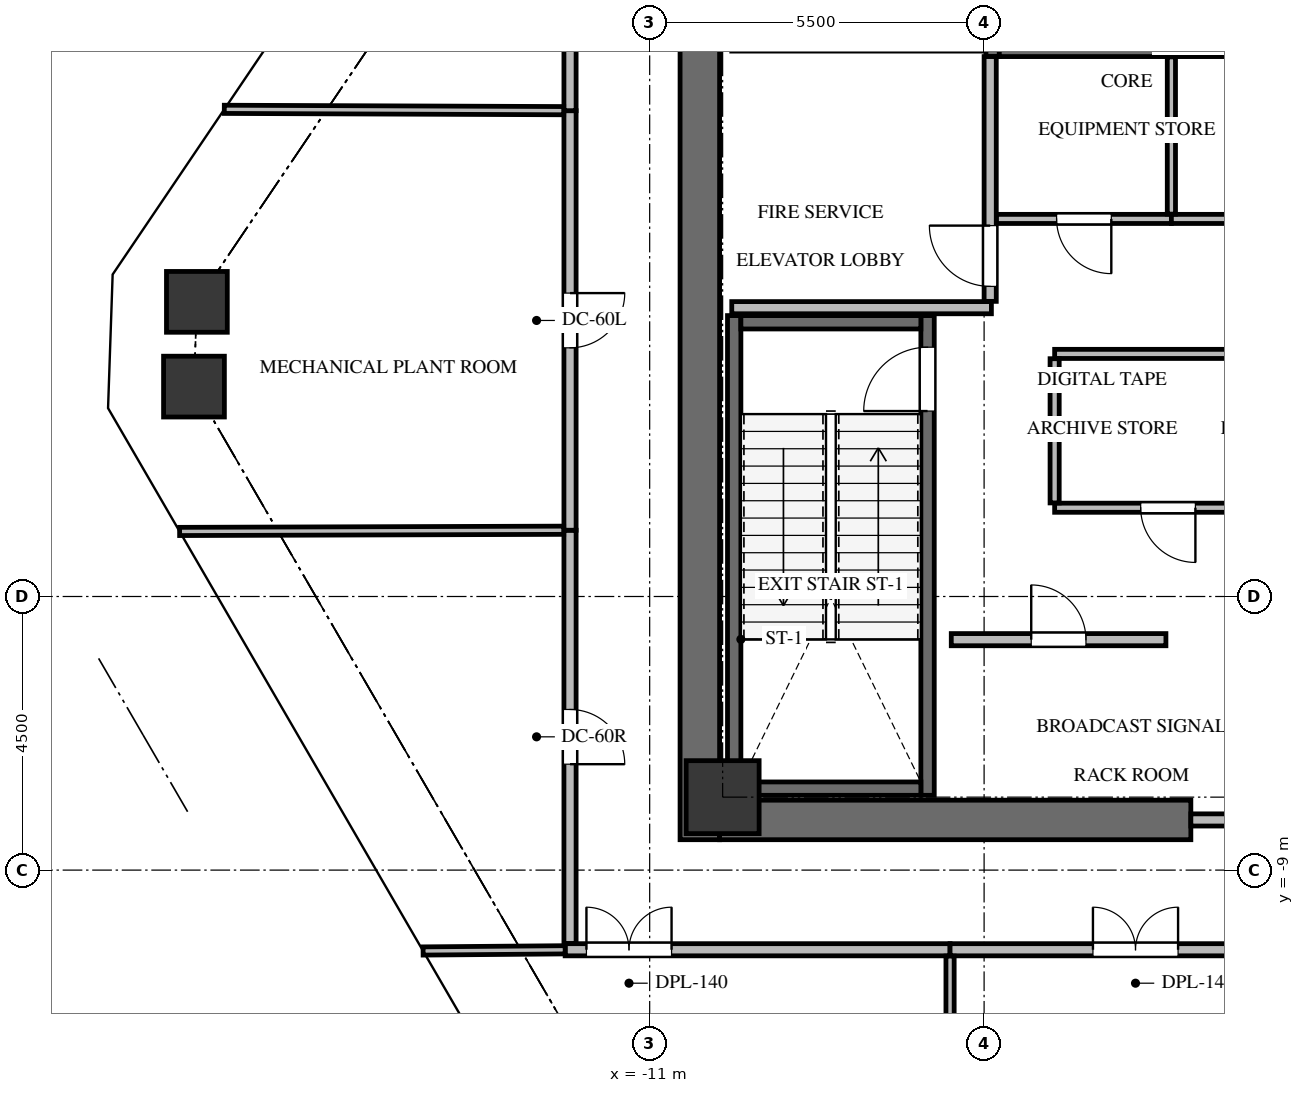
"""IFC4 building model, lengths in metres.
Left out: names, types, materials, properties, quantities, classifications, styles, units other than length and angle.
Written with IfcOpenShell. Run it as: python <this file> out.ifc"""

import sys

from ifc_helpers import new_model, si_unit, direction, frame, frame_2d, origin, origin_2d, place, context, subcontext, project, spatial, rectangle, extrude, source, transform, mapped, element, fill, save


model = new_model("IFC4")
c1 = context("Model", 3, precision=1e-05, world=origin(), true_north=direction((0.0, 1.0)))
c2 = subcontext(c1, "Body", "Model", "MODEL_VIEW")
j1 = project(units=[si_unit("LENGTHUNIT", "METRE"), si_unit("PLANEANGLEUNIT", "RADIAN")], contexts=[c1])
p1 = place(None, origin())
s1 = spatial("IfcSite", under=j1, at=p1, CompositionType="ELEMENT")
p2 = place(p1, origin())
s2 = spatial("IfcBuilding", under=s1, at=p2, CompositionType="ELEMENT")
p3 = place(p2, frame((0.0, 0.0, 213.4)))
s3 = spatial("IfcBuildingStorey", under=s2, at=p3, CompositionType="ELEMENT", Elevation=213.4)
p4 = place(p3, frame((-10.175, -8.5, 0.0), z_axis=(0.0, 0.0, 1.0), x_axis=(0.0, 1.0, 0.0)))
e1 = element("IfcWall", 1, at=p4, inside=s3, PredefinedType="SHEAR", context=c2, shape_type="SweptSolid", body=[
    extrude(rectangle(XDim=17.0, YDim=0.65, at=frame_2d((8.5, 0.0))), origin(), (0.0, 0.0, 1.0), 4.9),
])
p5 = place(p3, frame((-9.85, -8.175, 0.0), z_axis=(0.0, 0.0, 1.0), x_axis=(1.0, 0.0, 0.0)))
e2 = element("IfcWall", 2, at=p5, inside=s3, PredefinedType="SHEAR", context=c2, shape_type="SweptSolid", body=[
    extrude(rectangle(XDim=7.75, YDim=0.65, at=frame_2d((3.875, 0.0))), origin(), (0.0, 0.0, 1.0), 4.9),
])
p6 = place(p3, frame((-6.43, -7.77, -0.3), z_axis=(0.0, 0.0, 1.0), x_axis=(0.0, 1.0, 0.0)))
e3 = element("IfcWall", 3, at=p6, inside=s3, PredefinedType="SHEAR", context=c2, shape_type="SweptSolid", body=[
    extrude(rectangle(XDim=7.89, YDim=0.22, at=frame_2d((3.945, 0.0))), origin(), (0.0, 0.0, 1.0), 4.96),
])
p7 = place(p6, frame((6.32, 0.0, 0.0)))
e4 = element("IfcOpeningElement", 4, at=p7, cuts=e3, PredefinedType="OPENING", context=c2, shape_type="SweptSolid", body=[
    extrude(rectangle(XDim=1.05, YDim=2.15, at=frame_2d((0.525, 1.075))), frame((0.0, 0.12, 0.0), z_axis=(0.0, -1.0, 0.0), x_axis=(1.0, 0.0, 0.0)), (0.0, 0.0, 1.0), 0.24),
])
p8 = place(p3, frame((-9.61, 0.12, -0.3), z_axis=(0.0, 0.0, 1.0), x_axis=(0.0, -1.0, 0.0)))
e5 = element("IfcWall", 5, at=p8, inside=s3, PredefinedType="SHEAR", context=c2, shape_type="SweptSolid", body=[
    extrude(rectangle(XDim=7.89, YDim=0.22, at=frame_2d((3.945, 0.0))), origin(), (0.0, 0.0, 1.0), 4.96),
])
for number, where, z_axis, x_axis in (
    (6, (-9.5, -7.66, -0.3), (0.0, 0.0, 1.0), (1.0, 0.0, 0.0)),
    (7, (-6.54, 0.01, -0.3), (0.0, 0.0, 1.0), (-1.0, 0.0, 0.0)),
):
    element("IfcWall", number, at=place(p3, frame(where, z_axis=z_axis, x_axis=x_axis)), inside=s3, PredefinedType="SHEAR", context=c2, shape_type="SweptSolid", body=[
        extrude(rectangle(XDim=2.96, YDim=0.22, at=frame_2d((1.48, 0.0))), origin(), (0.0, 0.0, 1.0), 4.96),
    ])
p9 = place(p3, frame((-5.36, 7.78, -0.3), z_axis=(0.0, 0.0, 1.0), x_axis=(0.0, -1.0, 0.0)))
e8 = element("IfcWall", 8, at=p9, inside=s3, PredefinedType="SHEAR", context=c2, shape_type="SweptSolid", body=[
    extrude(rectangle(XDim=3.4, YDim=0.22, at=frame_2d((1.7, 0.0))), origin(), (0.0, 0.0, 1.0), 4.96),
])
p10 = place(p3, frame((-5.25, 4.49, -0.3), z_axis=(0.0, 0.0, 1.0), x_axis=(1.0, 0.0, 0.0)))
e9 = element("IfcWall", 9, at=p10, inside=s3, PredefinedType="SHEAR", context=c2, shape_type="SweptSolid", body=[
    extrude(rectangle(XDim=7.35, YDim=0.22, at=frame_2d((3.675, 0.0))), origin(), (0.0, 0.0, 1.0), 4.96),
])
p11 = place(p10, frame((5.85, 0.0, 0.0)))
e10 = element("IfcOpeningElement", 10, at=p11, cuts=e9, PredefinedType="OPENING", context=c2, shape_type="SweptSolid", body=[
    extrude(rectangle(XDim=1.05, YDim=2.15, at=frame_2d((0.525, 1.075))), frame((0.0, 0.12, 0.0), z_axis=(0.0, -1.0, 0.0), x_axis=(1.0, 0.0, 0.0)), (0.0, 0.0, 1.0), 0.24),
])
m1 = source(origin(), c2, "Body", "SweptSolid", [
    extrude(rectangle(XDim=1.2, YDim=1.2, at=origin_2d()), origin(), (0.0, 0.0, 1.0), 4.96),
])
p12 = place(p3, frame((-9.8, -7.8, -0.3), z_axis=(0.0, 0.0, 1.0), x_axis=(1.0, 0.0, 0.0)))
e11 = element("IfcColumn", 11, at=p12, inside=s3, PredefinedType="COLUMN", context=c2, shape_type="MappedRepresentation", body=[
    mapped(m1, transform((0.0, 0.0, 0.0), x_axis=(1.0, 0.0, 0.0), y_axis=(0.0, 1.0, 0.0), z_axis=(0.0, 0.0, 1.0), scale=1.0)),
])
m2 = source(origin(), c2, "Body", "SweptSolid", [
    extrude(rectangle(XDim=1.0, YDim=1.0, at=origin_2d()), origin(), (0.0, 0.0, 1.0), 4.96),
])
for number, where, z_axis, x_axis in (
    (12, (-18.494, -1.048, -0.3), (0.0, 0.0, 1.0), (1.0, 0.0, 0.0)),
    (13, (-18.446, 0.346, -0.3), (0.0, 0.0, 1.0), (1.0, 0.0, 0.0)),
):
    element("IfcColumn", number, at=place(p3, frame(where, z_axis=z_axis, x_axis=x_axis)), inside=s3, PredefinedType="COLUMN", context=c2, shape_type="MappedRepresentation", body=[
        mapped(m2, transform((0.0, 0.0, 0.0), x_axis=(1.0, 0.0, 0.0), y_axis=(0.0, 1.0, 0.0), z_axis=(0.0, 0.0, 1.0), scale=1.0)),
    ])
p13 = place(p3, frame((-2.1, -8.175, 0.0), z_axis=(0.0, 0.0, 1.0), x_axis=(1.0, 0.0, 0.0)))
e14 = element("IfcWall", 14, at=p13, inside=s3, PredefinedType="SOLIDWALL", context=c2, shape_type="SweptSolid", body=[
    extrude(rectangle(XDim=4.2, YDim=0.2, at=frame_2d((2.1, 0.0))), origin(), (0.0, 0.0, 1.0), 4.645),
])
p14 = place(p13, frame((1.2, 0.0, 0.0)))
e15 = element("IfcOpeningElement", 15, at=p14, cuts=e14, PredefinedType="OPENING", context=c2, shape_type="SweptSolid", body=[
    extrude(rectangle(XDim=1.8, YDim=2.15, at=frame_2d((0.9, 1.075))), frame((0.0, 0.11, 0.0), z_axis=(0.0, -1.0, 0.0), x_axis=(1.0, 0.0, 0.0)), (0.0, 0.0, 1.0), 0.22),
])
p15 = place(p3, frame((-9.65, 0.25, 0.0), z_axis=(0.0, 0.0, 1.0), x_axis=(1.0, 0.0, 0.0)))
e16 = element("IfcWall", 16, at=p15, inside=s3, PredefinedType="SOLIDWALL", context=c2, shape_type="SweptSolid", body=[
    extrude(rectangle(XDim=4.27, YDim=0.2, at=frame_2d((2.135, 0.0))), origin(), (0.0, 0.0, 1.0), 4.645),
])
p16 = place(p3, frame((-5.4, 0.354, 0.0), z_axis=(0.0, 0.0, 1.0), x_axis=(0.0, 1.0, 0.0)))
e17 = element("IfcWall", 17, at=p16, inside=s3, PredefinedType="SOLIDWALL", context=c2, shape_type="SweptSolid", body=[
    extrude(rectangle(XDim=4.026, YDim=0.2, at=frame_2d((2.013, 0.0))), origin(), (0.0, 0.0, 1.0), 4.645),
])
p17 = place(p16, frame((0.246, 0.0, 0.0)))
e18 = element("IfcOpeningElement", 18, at=p17, cuts=e17, PredefinedType="OPENING", context=c2, shape_type="SweptSolid", body=[
    extrude(rectangle(XDim=1.0, YDim=2.15, at=frame_2d((0.5, 1.075))), frame((0.0, 0.11, 0.0), z_axis=(0.0, -1.0, 0.0), x_axis=(1.0, 0.0, 0.0)), (0.0, 0.0, 1.0), 0.22),
])
p18 = place(p3, frame((-6.04, -5.21, 0.0), z_axis=(0.0, 0.0, 1.0), x_axis=(1.0, 0.0, 0.0)))
e19 = element("IfcWall", 19, at=p18, inside=s3, PredefinedType="SOLIDWALL", context=c2, shape_type="SweptSolid", body=[
    extrude(rectangle(XDim=3.53, YDim=0.2, at=frame_2d((1.765, 0.0))), origin(), (0.0, 0.0, 1.0), 4.645),
])
p19 = place(p18, frame((1.315, 0.0, 0.0)))
e20 = element("IfcOpeningElement", 20, at=p19, cuts=e19, PredefinedType="OPENING", context=c2, shape_type="SweptSolid", body=[
    extrude(rectangle(XDim=0.9, YDim=2.05, at=frame_2d((0.45, 1.025))), frame((0.0, 0.11, 0.0), z_axis=(0.0, -1.0, 0.0), x_axis=(1.0, 0.0, 0.0)), (0.0, 0.0, 1.0), 0.22),
])
p20 = place(p3, frame((-0.61, -3.04, 0.0), z_axis=(0.0, 0.0, 1.0), x_axis=(-1.0, 0.0, 0.0)))
e21 = element("IfcWall", 21, at=p20, inside=s3, PredefinedType="PARTITIONING", context=c2, shape_type="SweptSolid", body=[
    extrude(rectangle(XDim=3.73, YDim=0.15, at=frame_2d((1.865, 0.0))), origin(), (0.0, 0.0, 1.0), 4.645),
])
p21 = place(p20, frame((1.415, 0.0, 0.0)))
e22 = element("IfcOpeningElement", 22, at=p21, cuts=e21, PredefinedType="OPENING", context=c2, shape_type="SweptSolid", body=[
    extrude(rectangle(XDim=0.9, YDim=2.05, at=frame_2d((0.45, 1.025))), frame((0.0, 0.085, 0.0), z_axis=(0.0, -1.0, 0.0), x_axis=(1.0, 0.0, 0.0)), (0.0, 0.0, 1.0), 0.17),
])
p22 = place(p3, frame((-4.34, -0.51, 0.0), z_axis=(0.0, 0.0, 1.0), x_axis=(1.0, 0.0, 0.0)))
e23 = element("IfcWall", 23, at=p22, inside=s3, PredefinedType="PARTITIONING", context=c2, shape_type="SweptSolid", body=[
    extrude(rectangle(XDim=3.73, YDim=0.15, at=frame_2d((1.865, 0.0))), origin(), (0.0, 0.0, 1.0), 4.645),
])
p23 = place(p3, frame((-4.34, -2.961, 0.0), z_axis=(0.0, 0.0, 1.0), x_axis=(0.0, 1.0, 0.0)))
e24 = element("IfcWall", 24, at=p23, inside=s3, PredefinedType="PARTITIONING", context=c2, shape_type="SweptSolid", body=[
    extrude(rectangle(XDim=2.372, YDim=0.15, at=frame_2d((1.186, 0.0))), origin(), (0.0, 0.0, 1.0), 4.645),
])
p24 = place(p3, frame((-2.42, 1.71, 0.0), z_axis=(0.0, 0.0, 1.0), x_axis=(-1.0, 0.0, 0.0)))
e25 = element("IfcWall", 25, at=p24, inside=s3, PredefinedType="PARTITIONING", context=c2, shape_type="SweptSolid", body=[
    extrude(rectangle(XDim=2.876, YDim=0.15, at=frame_2d((1.438, 0.0))), origin(), (0.0, 0.0, 1.0), 4.645),
])
p25 = place(p24, frame((0.988, 0.0, 0.0)))
e26 = element("IfcOpeningElement", 26, at=p25, cuts=e25, PredefinedType="OPENING", context=c2, shape_type="SweptSolid", body=[
    extrude(rectangle(XDim=0.9, YDim=2.05, at=frame_2d((0.45, 1.025))), frame((0.0, 0.085, 0.0), z_axis=(0.0, -1.0, 0.0), x_axis=(1.0, 0.0, 0.0)), (0.0, 0.0, 1.0), 0.17),
])
p26 = place(p3, frame((0.52, 1.71, 0.0), z_axis=(0.0, 0.0, 1.0), x_axis=(-1.0, 0.0, 0.0)))
e27 = element("IfcWall", 27, at=p26, inside=s3, PredefinedType="PARTITIONING", context=c2, shape_type="SweptSolid", body=[
    extrude(rectangle(XDim=2.94, YDim=0.15, at=frame_2d((1.47, 0.0))), origin(), (0.0, 0.0, 1.0), 4.645),
])
p27 = place(p26, frame((1.02, 0.0, 0.0)))
e28 = element("IfcOpeningElement", 28, at=p27, cuts=e27, PredefinedType="OPENING", context=c2, shape_type="SweptSolid", body=[
    extrude(rectangle(XDim=0.9, YDim=2.05, at=frame_2d((0.45, 1.025))), frame((0.0, 0.085, 0.0), z_axis=(0.0, -1.0, 0.0), x_axis=(1.0, 0.0, 0.0)), (0.0, 0.0, 1.0), 0.17),
])
p28 = place(p3, frame((-12.39, -10.31, 0.0), z_axis=(0.0, 0.0, 1.0), x_axis=(1.0, 0.0, 0.0)))
e29 = element("IfcWall", 29, at=p28, inside=s3, PredefinedType="SOLIDWALL", context=c2, shape_type="SweptSolid", body=[
    extrude(rectangle(XDim=6.33, YDim=0.2, at=frame_2d((3.165, 0.0))), origin(), (0.0, 0.0, 1.0), 4.645),
])
p29 = place(p28, frame((0.35, 0.0, 0.0)))
e30 = element("IfcOpeningElement", 30, at=p29, cuts=e29, PredefinedType="OPENING", context=c2, shape_type="SweptSolid", body=[
    extrude(rectangle(XDim=1.4, YDim=2.15, at=frame_2d((0.7, 1.075))), frame((0.0, 0.11, 0.0), z_axis=(0.0, -1.0, 0.0), x_axis=(1.0, 0.0, 0.0)), (0.0, 0.0, 1.0), 0.22),
])
p30 = place(p3, frame((-6.06, -10.31, 0.0), z_axis=(0.0, 0.0, 1.0), x_axis=(1.0, 0.0, 0.0)))
e31 = element("IfcWall", 31, at=p30, inside=s3, PredefinedType="SOLIDWALL", context=c2, shape_type="SweptSolid", body=[
    extrude(rectangle(XDim=6.1, YDim=0.2, at=frame_2d((3.05, 0.0))), origin(), (0.0, 0.0, 1.0), 3.901),
])
p31 = place(p30, frame((2.35, 0.0, 0.0)))
e32 = element("IfcOpeningElement", 32, at=p31, cuts=e31, PredefinedType="OPENING", context=c2, shape_type="SweptSolid", body=[
    extrude(rectangle(XDim=1.4, YDim=2.15, at=frame_2d((0.7, 1.075))), frame((0.0, 0.11, 0.0), z_axis=(0.0, -1.0, 0.0), x_axis=(1.0, 0.0, 0.0)), (0.0, 0.0, 1.0), 0.22),
])
p32 = place(p3, frame((-12.31, -3.41, 0.0), z_axis=(0.0, 0.0, 1.0), x_axis=(0.0, -1.0, 0.0)))
e33 = element("IfcWall", 33, at=p32, inside=s3, PredefinedType="SOLIDWALL", context=c2, shape_type="SweptSolid", body=[
    extrude(rectangle(XDim=6.796, YDim=0.2, at=frame_2d((3.398, 0.0))), origin(), (0.0, 0.0, 1.0), 4.645),
])
p33 = place(p32, frame((2.948, 0.0, 0.0)))
e34 = element("IfcOpeningElement", 34, at=p33, cuts=e33, PredefinedType="OPENING", context=c2, shape_type="SweptSolid", body=[
    extrude(rectangle(XDim=0.9, YDim=2.05, at=frame_2d((0.45, 1.025))), frame((0.0, 0.11, 0.0), z_axis=(0.0, -1.0, 0.0), x_axis=(1.0, 0.0, 0.0)), (0.0, 0.0, 1.0), 0.22),
])
p34 = place(p3, frame((-12.31, 3.49, 0.0), z_axis=(0.0, 0.0, 1.0), x_axis=(0.0, -1.0, 0.0)))
e35 = element("IfcWall", 35, at=p34, inside=s3, PredefinedType="SOLIDWALL", context=c2, shape_type="SweptSolid", body=[
    extrude(rectangle(XDim=6.9, YDim=0.2, at=frame_2d((3.45, 0.0))), origin(), (0.0, 0.0, 1.0), 3.901),
])
p35 = place(p34, frame((3.0, 0.0, 0.0)))
e36 = element("IfcOpeningElement", 36, at=p35, cuts=e35, PredefinedType="OPENING", context=c2, shape_type="SweptSolid", body=[
    extrude(rectangle(XDim=0.9, YDim=2.05, at=frame_2d((0.45, 1.025))), frame((0.0, 0.11, 0.0), z_axis=(0.0, -1.0, 0.0), x_axis=(1.0, 0.0, 0.0)), (0.0, 0.0, 1.0), 0.22),
])
p36 = place(p3, frame((-12.31, 10.206, 0.0), z_axis=(0.0, 0.0, 1.0), x_axis=(0.0, -1.0, 0.0)))
e37 = element("IfcWall", 37, at=p36, inside=s3, PredefinedType="SOLIDWALL", context=c2, shape_type="SweptSolid", body=[
    extrude(rectangle(XDim=6.716, YDim=0.2, at=frame_2d((3.358, 0.0))), origin(), (0.0, 0.0, 1.0), 3.999),
])
p37 = place(p36, frame((2.908, 0.0, 0.0)))
e38 = element("IfcOpeningElement", 38, at=p37, cuts=e37, PredefinedType="OPENING", context=c2, shape_type="SweptSolid", body=[
    extrude(rectangle(XDim=0.9, YDim=2.05, at=frame_2d((0.45, 1.025))), frame((0.0, 0.11, 0.0), z_axis=(0.0, -1.0, 0.0), x_axis=(1.0, 0.0, 0.0)), (0.0, 0.0, 1.0), 0.22),
])
p38 = place(p3, frame((-2.42, 4.375, 0.0), z_axis=(0.0, 0.0, 1.0), x_axis=(0.0, -1.0, 0.0)))
e39 = element("IfcWall", 39, at=p38, inside=s3, PredefinedType="PARTITIONING", context=c2, shape_type="SweptSolid", body=[
    extrude(rectangle(XDim=2.586, YDim=0.135, at=frame_2d((1.293, 0.0))), origin(), (0.0, 0.0, 1.0), 4.645),
])
p39 = place(p3, frame((-6.06, -10.414, 0.0), z_axis=(0.0, 0.0, 1.0), x_axis=(0.0, -1.0, 0.0)))
e40 = element("IfcWall", 40, at=p39, inside=s3, PredefinedType="PARTITIONING", context=c2, shape_type="SweptSolid", body=[
    extrude(rectangle(XDim=6.772, YDim=0.135, at=frame_2d((3.386, 0.0))), origin(), (0.0, 0.0, 1.0), 3.901),
])
p40 = place(p3, frame((-14.726, -10.33, 0.0), z_axis=(0.0, 0.0, 1.0), x_axis=(0.99996592241, 0.008255544766, 0.0)))
e41 = element("IfcWall", 41, at=p40, inside=s3, PredefinedType="PARTITIONING", context=c2, shape_type="SweptSolid", body=[
    extrude(rectangle(XDim=2.336, YDim=0.135, at=frame_2d((1.168, 0.0))), origin(), (0.0, 0.0, 1.0), 3.999),
])
p41 = place(p3, frame((-18.73, -3.43, 0.0), z_axis=(0.0, 0.0, 1.0), x_axis=(0.999995099089, 0.00313078243, 0.0)))
e42 = element("IfcWall", 42, at=p41, inside=s3, PredefinedType="PARTITIONING", context=c2, shape_type="SweptSolid", body=[
    extrude(rectangle(XDim=6.316, YDim=0.135, at=frame_2d((3.158, 0.0))), origin(), (0.0, 0.0, 1.0), 3.999),
])
p42 = place(p3, frame((-17.996, 3.512, 0.0), z_axis=(0.0, 0.0, 1.0), x_axis=(0.99999225143, -0.003936632956, 0.0)))
e43 = element("IfcWall", 43, at=p42, inside=s3, PredefinedType="PARTITIONING", context=c2, shape_type="SweptSolid", body=[
    extrude(rectangle(XDim=5.582, YDim=0.135, at=frame_2d((2.791, 0.0))), origin(), (0.0, 0.0, 1.0), 3.999),
])
m3 = source(origin(), c2, "Body", "SweptSolid", [
    extrude(rectangle(XDim=1.05, YDim=2.15, at=frame_2d((0.525, 1.075))), frame((0.0, 0.025, 0.0), z_axis=(0.0, -1.0, 0.0), x_axis=(1.0, 0.0, 0.0)), (0.0, 0.0, 1.0), 0.05),
])
p43 = place(p7, origin())
e44 = element("IfcDoor", 44, at=p43, inside=s3, OperationType="SINGLE_SWING_LEFT", PredefinedType="DOOR", context=c2, shape_type="MappedRepresentation", body=[
    mapped(m3, transform((0.0, 0.0, 0.0), x_axis=(1.0, 0.0, 0.0), y_axis=(0.0, 1.0, 0.0), z_axis=(0.0, 0.0, 1.0), scale=1.0)),
])
fill(e4, e44)
m4 = source(origin(), c2, "Body", "SweptSolid", [
    extrude(rectangle(XDim=1.0, YDim=2.15, at=frame_2d((0.5, 1.075))), frame((0.0, 0.025, 0.0), z_axis=(0.0, -1.0, 0.0), x_axis=(1.0, 0.0, 0.0)), (0.0, 0.0, 1.0), 0.05),
])
p44 = place(p17, origin())
e45 = element("IfcDoor", 45, at=p44, inside=s3, OperationType="SINGLE_SWING_RIGHT", PredefinedType="DOOR", context=c2, shape_type="MappedRepresentation", body=[
    mapped(m4, transform((0.0, 0.0, 0.0), x_axis=(1.0, 0.0, 0.0), y_axis=(0.0, 1.0, 0.0), z_axis=(0.0, 0.0, 1.0), scale=1.0)),
])
fill(e18, e45)
m5 = source(origin(), c2, "Body", "SweptSolid", [
    extrude(rectangle(XDim=0.9, YDim=2.05, at=frame_2d((0.45, 1.025))), frame((0.0, 0.025, 0.0), z_axis=(0.0, -1.0, 0.0), x_axis=(1.0, 0.0, 0.0)), (0.0, 0.0, 1.0), 0.05),
])
p45 = place(p19, origin())
e46 = element("IfcDoor", 46, at=p45, inside=s3, OperationType="SINGLE_SWING_LEFT", PredefinedType="DOOR", context=c2, shape_type="MappedRepresentation", body=[
    mapped(m5, transform((0.0, 0.0, 0.0), x_axis=(1.0, 0.0, 0.0), y_axis=(0.0, 1.0, 0.0), z_axis=(0.0, 0.0, 1.0), scale=1.0)),
])
fill(e20, e46)
p46 = place(p21, origin())
e47 = element("IfcDoor", 47, at=p46, inside=s3, OperationType="SINGLE_SWING_LEFT", PredefinedType="DOOR", context=c2, shape_type="MappedRepresentation", body=[
    mapped(m5, transform((0.0, 0.0, 0.0), x_axis=(1.0, 0.0, 0.0), y_axis=(0.0, 1.0, 0.0), z_axis=(0.0, 0.0, 1.0), scale=1.0)),
])
fill(e22, e47)
p47 = place(p25, origin())
e48 = element("IfcDoor", 48, at=p47, inside=s3, OperationType="SINGLE_SWING_LEFT", PredefinedType="DOOR", context=c2, shape_type="MappedRepresentation", body=[
    mapped(m5, transform((0.0, 0.0, 0.0), x_axis=(1.0, 0.0, 0.0), y_axis=(0.0, 1.0, 0.0), z_axis=(0.0, 0.0, 1.0), scale=1.0)),
])
fill(e26, e48)
m6 = source(origin(), c2, "Body", "SweptSolid", [
    extrude(rectangle(XDim=1.4, YDim=2.15, at=frame_2d((0.7, 1.075))), frame((0.0, 0.025, 0.0), z_axis=(0.0, -1.0, 0.0), x_axis=(1.0, 0.0, 0.0)), (0.0, 0.0, 1.0), 0.05),
])
p48 = place(p29, origin())
e49 = element("IfcDoor", 49, at=p48, inside=s3, OperationType="DOUBLE_DOOR_SINGLE_SWING", PredefinedType="DOOR", context=c2, shape_type="MappedRepresentation", body=[
    mapped(m6, transform((0.0, 0.0, 0.0), x_axis=(1.0, 0.0, 0.0), y_axis=(0.0, 1.0, 0.0), z_axis=(0.0, 0.0, 1.0), scale=1.0)),
])
fill(e30, e49)
p49 = place(p31, origin())
e50 = element("IfcDoor", 50, at=p49, inside=s3, OperationType="DOUBLE_DOOR_SINGLE_SWING", PredefinedType="DOOR", context=c2, shape_type="MappedRepresentation", body=[
    mapped(m6, transform((0.0, 0.0, 0.0), x_axis=(1.0, 0.0, 0.0), y_axis=(0.0, 1.0, 0.0), z_axis=(0.0, 0.0, 1.0), scale=1.0)),
])
fill(e32, e50)
m7 = source(origin(), c2, "Body", "SweptSolid", [
    extrude(rectangle(XDim=0.9, YDim=2.05, at=frame_2d((0.45, 1.025))), frame((0.0, 0.025, 0.0), z_axis=(0.0, -1.0, 0.0), x_axis=(1.0, 0.0, 0.0)), (0.0, 0.0, 1.0), 0.05),
])
p50 = place(p33, origin())
e51 = element("IfcDoor", 51, at=p50, inside=s3, OperationType="SINGLE_SWING_RIGHT", PredefinedType="DOOR", context=c2, shape_type="MappedRepresentation", body=[
    mapped(m7, transform((0.0, 0.0, 0.0), x_axis=(1.0, 0.0, 0.0), y_axis=(0.0, 1.0, 0.0), z_axis=(0.0, 0.0, 1.0), scale=1.0)),
])
fill(e34, e51)
p51 = place(p35, origin())
e52 = element("IfcDoor", 52, at=p51, inside=s3, OperationType="SINGLE_SWING_LEFT", PredefinedType="DOOR", context=c2, shape_type="MappedRepresentation", body=[
    mapped(m5, transform((0.0, 0.0, 0.0), x_axis=(1.0, 0.0, 0.0), y_axis=(0.0, 1.0, 0.0), z_axis=(0.0, 0.0, 1.0), scale=1.0)),
])
fill(e36, e52)
save(model, sys.argv[1])
